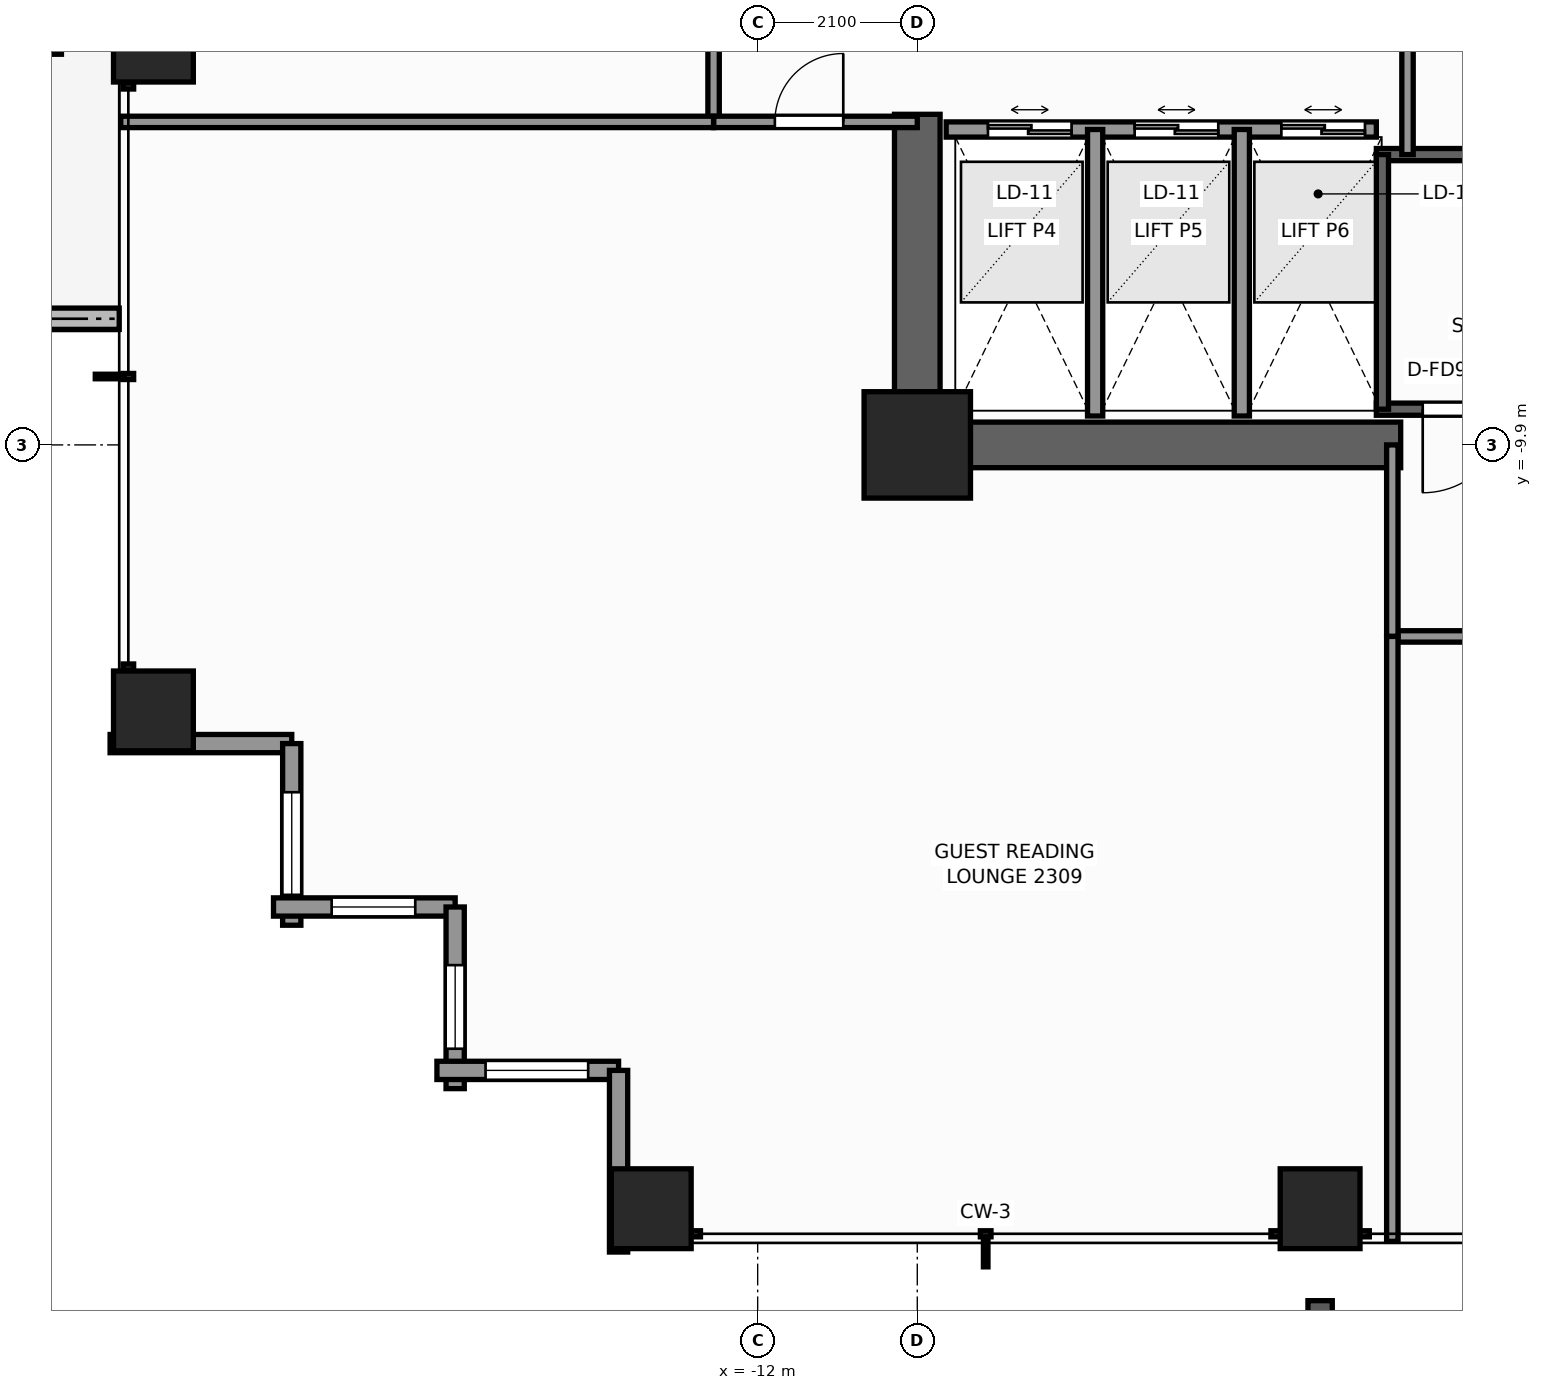
"""IFC4 building model, lengths in metres.
Left out: names, types, materials, properties, quantities, classifications, styles, units other than length and angle.
Written with IfcOpenShell. Run it as: python <this file> out.ifc"""

import sys

from ifc_helpers import new_model, si_unit, direction, frame, frame_2d, origin, origin_2d, place, context, subcontext, project, spatial, rectangle, extrude, element, fill, save


model = new_model("IFC4")
c1 = context("Model", 3, precision=1e-05, world=origin(), true_north=direction((0.0, 1.0)))
c2 = subcontext(c1, "Body", "Model", "MODEL_VIEW")
j1 = project(units=[si_unit("LENGTHUNIT", "METRE"), si_unit("PLANEANGLEUNIT", "RADIAN")], contexts=[c1])
p1 = place(None, origin())
s1 = spatial("IfcSite", under=j1, at=p1, CompositionType="ELEMENT")
p2 = place(p1, origin())
s2 = spatial("IfcBuilding", under=s1, at=p2, CompositionType="ELEMENT")
p3 = place(p2, frame((0.0, 0.0, 82.1)))
s3 = spatial("IfcBuildingStorey", under=s2, at=p3, CompositionType="ELEMENT", Elevation=82.1)
p4 = place(p3, frame((-3.54, -9.9, 0.0), z_axis=(0.0, 0.0, 1.0), x_axis=(-1.0, 0.0, 0.0)))
e1 = element("IfcWall", 1, at=p4, inside=s3, PredefinedType="SHEAR", context=c2, shape_type="SweptSolid", body=[
    extrude(rectangle(XDim=6.66, YDim=0.6, at=frame_2d((3.33, 0.0))), origin(), (0.0, 0.0, 1.0), 3.3),
])
p5 = place(p3, frame((-9.9, -9.6, 0.0), z_axis=(0.0, 0.0, 1.0), x_axis=(0.0, 1.0, 0.0)))
e2 = element("IfcWall", 2, at=p5, inside=s3, PredefinedType="SHEAR", context=c2, shape_type="SweptSolid", body=[
    extrude(rectangle(XDim=4.05, YDim=0.6, at=frame_2d((2.025, 0.0))), origin(), (0.0, 0.0, 1.0), 3.3),
])
p6 = place(p3, frame((-9.9, -9.9, 0.0), z_axis=(0.0, 0.0, 1.0), x_axis=(1.0, 0.0, 0.0)))
e3 = element("IfcColumn", 3, at=p6, inside=s3, PredefinedType="COLUMN", context=c2, shape_type="SweptSolid", body=[
    extrude(rectangle(XDim=1.4, YDim=1.4, at=origin_2d()), origin(), (0.0, 0.0, 1.0), 3.3),
])
for number, where, z_axis, x_axis in (
    (4, (-13.4, -19.95, 0.0), (0.0, 0.0, 1.0), (1.0, 0.0, 0.0)),
    (5, (-4.6, -19.95, 0.0), (0.0, 0.0, 1.0), (1.0, 0.0, 0.0)),
    (6, (-19.95, -13.4, 0.0), (0.0, 0.0, 1.0), (1.0, 0.0, 0.0)),
    (7, (-19.95, -4.6, 0.0), (0.0, 0.0, 1.0), (1.0, 0.0, 0.0)),
):
    element("IfcColumn", number, at=place(p3, frame(where, z_axis=z_axis, x_axis=x_axis)), inside=s3, PredefinedType="COLUMN", context=c2, shape_type="SweptSolid", body=[
        extrude(rectangle(XDim=1.05, YDim=1.05, at=origin_2d()), origin(), (0.0, 0.0, 1.0), 3.3),
    ])
p7 = place(p3, frame((-23.82, -8.24, -0.04), z_axis=(0.0, 0.0, 1.0), x_axis=(1.0, 0.0, 0.0)))
e8 = element("IfcWall", 8, at=p7, inside=s3, PredefinedType="PARAPET", context=c2, shape_type="SweptSolid", body=[
    extrude(rectangle(XDim=3.42, YDim=0.28, at=frame_2d((1.71, 0.0))), origin(), (0.0, 0.0, 1.0), 0.42),
])
p8 = place(p3, frame((-18.13, -13.83, 0.0), z_axis=(0.0, 0.0, 1.0), x_axis=(-1.0, 0.0, 0.0)))
e9 = element("IfcWall", 9, at=p8, inside=s3, PredefinedType="STANDARD", context=c2, shape_type="SweptSolid", body=[
    extrude(rectangle(XDim=2.39, YDim=0.24, at=frame_2d((1.195, 0.0))), origin(), (0.0, 0.0, 1.0), 2.459),
])
p9 = place(p3, frame((-18.13, -16.22, 0.0), z_axis=(0.0, 0.0, 1.0), x_axis=(0.0, 1.0, 0.0)))
e10 = element("IfcWall", 10, at=p9, inside=s3, PredefinedType="STANDARD", context=c2, shape_type="SweptSolid", body=[
    extrude(rectangle(XDim=2.39, YDim=0.24, at=frame_2d((1.195, 0.0))), origin(), (0.0, 0.0, 1.0), 2.459),
])
p10 = place(p9, frame((0.4, 0.0, 0.65)))
e11 = element("IfcOpeningElement", 11, at=p10, cuts=e10, PredefinedType="OPENING", context=c2, shape_type="SweptSolid", body=[
    extrude(rectangle(XDim=1.35, YDim=1.55, at=frame_2d((0.675, 0.775))), frame((0.0, 0.13, 0.0), z_axis=(0.0, -1.0, 0.0), x_axis=(1.0, 0.0, 0.0)), (0.0, 0.0, 1.0), 0.26),
])
p11 = place(p3, frame((-15.98, -15.98, 0.0), z_axis=(0.0, 0.0, 1.0), x_axis=(-1.0, 0.0, 0.0)))
e12 = element("IfcWall", 12, at=p11, inside=s3, PredefinedType="STANDARD", context=c2, shape_type="SweptSolid", body=[
    extrude(rectangle(XDim=2.39, YDim=0.24, at=frame_2d((1.195, 0.0))), origin(), (0.0, 0.0, 1.0), 2.459),
])
p12 = place(p11, frame((0.525, 0.0, 0.65)))
e13 = element("IfcOpeningElement", 13, at=p12, cuts=e12, PredefinedType="OPENING", context=c2, shape_type="SweptSolid", body=[
    extrude(rectangle(XDim=1.1, YDim=1.45, at=frame_2d((0.55, 0.725))), frame((0.0, 0.13, 0.0), z_axis=(0.0, -1.0, 0.0), x_axis=(1.0, 0.0, 0.0)), (0.0, 0.0, 1.0), 0.26),
])
p13 = place(p3, frame((-15.98, -18.37, 0.0), z_axis=(0.0, 0.0, 1.0), x_axis=(0.0, 1.0, 0.0)))
e14 = element("IfcWall", 14, at=p13, inside=s3, PredefinedType="STANDARD", context=c2, shape_type="SweptSolid", body=[
    extrude(rectangle(XDim=2.39, YDim=0.24, at=frame_2d((1.195, 0.0))), origin(), (0.0, 0.0, 1.0), 2.459),
])
p14 = place(p13, frame((0.525, 0.0, 0.65)))
e15 = element("IfcOpeningElement", 15, at=p14, cuts=e14, PredefinedType="OPENING", context=c2, shape_type="SweptSolid", body=[
    extrude(rectangle(XDim=1.1, YDim=1.45, at=frame_2d((0.55, 0.725))), frame((0.0, 0.13, 0.0), z_axis=(0.0, -1.0, 0.0), x_axis=(1.0, 0.0, 0.0)), (0.0, 0.0, 1.0), 0.26),
])
p15 = place(p3, frame((-13.83, -18.13, 0.0), z_axis=(0.0, 0.0, 1.0), x_axis=(-1.0, 0.0, 0.0)))
e16 = element("IfcWall", 16, at=p15, inside=s3, PredefinedType="STANDARD", context=c2, shape_type="SweptSolid", body=[
    extrude(rectangle(XDim=2.39, YDim=0.24, at=frame_2d((1.195, 0.0))), origin(), (0.0, 0.0, 1.0), 2.459),
])
p16 = place(p15, frame((0.4, 0.0, 0.65)))
e17 = element("IfcOpeningElement", 17, at=p16, cuts=e16, PredefinedType="OPENING", context=c2, shape_type="SweptSolid", body=[
    extrude(rectangle(XDim=1.35, YDim=1.55, at=frame_2d((0.675, 0.775))), frame((0.0, 0.13, 0.0), z_axis=(0.0, -1.0, 0.0), x_axis=(1.0, 0.0, 0.0)), (0.0, 0.0, 1.0), 0.26),
])
p17 = place(p3, frame((-13.83, -20.52, 0.0), z_axis=(0.0, 0.0, 1.0), x_axis=(0.0, 1.0, 0.0)))
e18 = element("IfcWall", 18, at=p17, inside=s3, PredefinedType="STANDARD", context=c2, shape_type="SweptSolid", body=[
    extrude(rectangle(XDim=2.39, YDim=0.24, at=frame_2d((1.195, 0.0))), origin(), (0.0, 0.0, 1.0), 2.459),
])
p18 = place(p3, frame((3.86, -9.43, 0.0), z_axis=(0.0, 0.0, 1.0), x_axis=(-1.0, 0.0, 0.0)))
e19 = element("IfcWall", 19, at=p18, inside=s3, PredefinedType="SHEAR", context=c2, shape_type="SweptSolid", body=[
    extrude(rectangle(XDim=7.72, YDim=0.16, at=frame_2d((3.86, 0.0))), origin(), (0.0, 0.0, 1.0), 3.3),
])
p19 = place(p18, frame((6.01, 0.0, 0.0)))
e20 = element("IfcOpeningElement", 20, at=p19, cuts=e19, PredefinedType="OPENING", context=c2, shape_type="SweptSolid", body=[
    extrude(rectangle(XDim=1.1, YDim=2.2, at=frame_2d((0.55, 1.1))), frame((0.0, 0.09, 0.0), z_axis=(0.0, -1.0, 0.0), x_axis=(1.0, 0.0, 0.0)), (0.0, 0.0, 1.0), 0.18),
])
p20 = place(p3, frame((-3.86, -6.08, 0.0), z_axis=(0.0, 0.0, 1.0), x_axis=(1.0, 0.0, 0.0)))
e21 = element("IfcWall", 21, at=p20, inside=s3, PredefinedType="SHEAR", context=c2, shape_type="SweptSolid", body=[
    extrude(rectangle(XDim=7.72, YDim=0.16, at=frame_2d((3.86, 0.0))), origin(), (0.0, 0.0, 1.0), 3.3),
])
p21 = place(p3, frame((-3.78, -9.43, 0.0), z_axis=(0.0, 0.0, 1.0), x_axis=(0.0, 1.0, 0.0)))
e22 = element("IfcWall", 22, at=p21, inside=s3, PredefinedType="SHEAR", context=c2, shape_type="SweptSolid", body=[
    extrude(rectangle(XDim=3.35, YDim=0.16, at=frame_2d((1.675, 0.0))), origin(), (0.0, 0.0, 1.0), 3.3),
])
p22 = place(p3, frame((-9.52, -5.75, 0.0), z_axis=(0.0, 0.0, 1.0), x_axis=(1.0, 0.0, 0.0)))
e23 = element("IfcWall", 23, at=p22, inside=s3, PredefinedType="SOLIDWALL", context=c2, shape_type="SweptSolid", body=[
    extrude(rectangle(XDim=5.66, YDim=0.2, at=frame_2d((2.83, 0.0))), origin(), (0.0, 0.0, 1.0), 3.08),
])
p23 = place(p22, frame((0.55, 0.0, 0.0)))
e24 = element("IfcOpeningElement", 24, at=p23, cuts=e23, PredefinedType="OPENING", context=c2, shape_type="SweptSolid", body=[
    extrude(rectangle(XDim=1.1, YDim=2.2, at=frame_2d((0.55, 1.1))), frame((0.0, 0.11, 0.0), z_axis=(0.0, -1.0, 0.0), x_axis=(1.0, 0.0, 0.0)), (0.0, 0.0, 1.0), 0.22),
])
p24 = place(p22, frame((2.48, 0.0, 0.0)))
e25 = element("IfcOpeningElement", 25, at=p24, cuts=e23, PredefinedType="OPENING", context=c2, shape_type="SweptSolid", body=[
    extrude(rectangle(XDim=1.1, YDim=2.2, at=frame_2d((0.55, 1.1))), frame((0.0, 0.11, 0.0), z_axis=(0.0, -1.0, 0.0), x_axis=(1.0, 0.0, 0.0)), (0.0, 0.0, 1.0), 0.22),
])
p25 = place(p22, frame((4.41, 0.0, 0.0)))
e26 = element("IfcOpeningElement", 26, at=p25, cuts=e23, PredefinedType="OPENING", context=c2, shape_type="SweptSolid", body=[
    extrude(rectangle(XDim=1.1, YDim=2.2, at=frame_2d((0.55, 1.1))), frame((0.0, 0.11, 0.0), z_axis=(0.0, -1.0, 0.0), x_axis=(1.0, 0.0, 0.0)), (0.0, 0.0, 1.0), 0.22),
])
for number, where, z_axis, x_axis in (
    (27, (-7.56, -9.52, 0.0), (0.0, 0.0, 1.0), (0.0, 1.0, 0.0)),
    (28, (-5.63, -9.52, 0.0), (0.0, 0.0, 1.0), (0.0, 1.0, 0.0)),
):
    element("IfcWall", number, at=place(p3, frame(where, z_axis=z_axis, x_axis=x_axis)), inside=s3, PredefinedType="SOLIDWALL", context=c2, shape_type="SweptSolid", body=[
        extrude(rectangle(XDim=3.77, YDim=0.2, at=frame_2d((1.885, 0.0))), origin(), (0.0, 0.0, 1.0), 3.08),
    ])
p26 = place(p3, frame((-3.45, -6.08, 0.0), z_axis=(0.0, 0.0, 1.0), x_axis=(0.0, 1.0, 0.0)))
e29 = element("IfcWall", 29, at=p26, inside=s3, PredefinedType="PARTITIONING", context=c2, shape_type="SweptSolid", body=[
    extrude(rectangle(XDim=2.36, YDim=0.15, at=frame_2d((1.18, 0.0))), origin(), (0.0, 0.0, 1.0), 3.08),
])
p27 = place(p3, frame((-3.65, -12.42, 0.0), z_axis=(0.0, 0.0, 1.0), x_axis=(1.0, 0.0, 0.0)))
e30 = element("IfcWall", 30, at=p27, inside=s3, PredefinedType="PARTITIONING", context=c2, shape_type="SweptSolid", body=[
    extrude(rectangle(XDim=16.23, YDim=0.15, at=frame_2d((8.115, 0.0))), origin(), (0.0, 0.0, 1.0), 2.292),
])
p28 = place(p27, frame((1.405, 0.0, 0.0)))
e31 = element("IfcOpeningElement", 31, at=p28, cuts=e30, PredefinedType="OPENING", context=c2, shape_type="SweptSolid", body=[
    extrude(rectangle(XDim=0.95, YDim=2.06, at=frame_2d((0.475, 1.03))), frame((0.0, 0.085, 0.0), z_axis=(0.0, -1.0, 0.0), x_axis=(1.0, 0.0, 0.0)), (0.0, 0.0, 1.0), 0.17),
])
p29 = place(p27, frame((10.735, 0.0, 0.0)))
e32 = element("IfcOpeningElement", 32, at=p29, cuts=e30, PredefinedType="OPENING", context=c2, shape_type="SweptSolid", body=[
    extrude(rectangle(XDim=0.9, YDim=2.06, at=frame_2d((0.45, 1.03))), frame((0.0, 0.085, 0.0), z_axis=(0.0, -1.0, 0.0), x_axis=(1.0, 0.0, 0.0)), (0.0, 0.0, 1.0), 0.17),
])
p30 = place(p3, frame((-3.65, -12.42, 0.0), z_axis=(0.0, 0.0, 1.0), x_axis=(0.0, 1.0, 0.0)))
e33 = element("IfcWall", 33, at=p30, inside=s3, PredefinedType="PARTITIONING", context=c2, shape_type="SweptSolid", body=[
    extrude(rectangle(XDim=2.52, YDim=0.15, at=frame_2d((1.26, 0.0))), origin(), (0.0, 0.0, 1.0), 3.08),
])
p31 = place(p3, frame((-12.58, -5.65, 0.0), z_axis=(0.0, 0.0, 1.0), x_axis=(0.0, 1.0, 0.0)))
e34 = element("IfcWall", 34, at=p31, inside=s3, PredefinedType="PARTITIONING", context=c2, shape_type="SweptSolid", body=[
    extrude(rectangle(XDim=3.6, YDim=0.15, at=frame_2d((1.8, 0.0))), origin(), (0.0, 0.0, 1.0), 2.292),
])
p32 = place(p31, frame((2.156, 0.0, 0.0)))
e35 = element("IfcOpeningElement", 35, at=p32, cuts=e34, PredefinedType="OPENING", context=c2, shape_type="SweptSolid", body=[
    extrude(rectangle(XDim=0.9, YDim=2.06, at=frame_2d((0.45, 1.03))), frame((0.0, 0.085, 0.0), z_axis=(0.0, -1.0, 0.0), x_axis=(1.0, 0.0, 0.0)), (0.0, 0.0, 1.0), 0.17),
])
p33 = place(p3, frame((-12.58, -5.65, 0.0), z_axis=(0.0, 0.0, 1.0), x_axis=(1.0, 0.0, 0.0)))
e36 = element("IfcWall", 36, at=p33, inside=s3, PredefinedType="PARTITIONING", context=c2, shape_type="SweptSolid", body=[
    extrude(rectangle(XDim=2.68, YDim=0.15, at=frame_2d((1.34, 0.0))), origin(), (0.0, 0.0, 1.0), 3.08),
])
p34 = place(p33, frame((0.806, 0.0, 0.0)))
e37 = element("IfcOpeningElement", 37, at=p34, cuts=e36, PredefinedType="OPENING", context=c2, shape_type="SweptSolid", body=[
    extrude(rectangle(XDim=0.9, YDim=2.06, at=frame_2d((0.45, 1.03))), frame((0.0, 0.085, 0.0), z_axis=(0.0, -1.0, 0.0), x_axis=(1.0, 0.0, 0.0)), (0.0, 0.0, 1.0), 0.17),
])
p35 = place(p3, frame((-20.38, -5.65, 0.0), z_axis=(0.0, 0.0, 1.0), x_axis=(1.0, 0.0, 0.0)))
e38 = element("IfcWall", 38, at=p35, inside=s3, PredefinedType="PARTITIONING", context=c2, shape_type="SweptSolid", body=[
    extrude(rectangle(XDim=7.8, YDim=0.15, at=frame_2d((3.9, 0.0))), origin(), (0.0, 0.0, 1.0), 2.449),
])
p36 = place(p3, frame((-3.65, -20.38, 0.0), z_axis=(0.0, 0.0, 1.0), x_axis=(0.0, 1.0, 0.0)))
e39 = element("IfcWall", 39, at=p36, inside=s3, PredefinedType="PARTITIONING", context=c2, shape_type="SweptSolid", body=[
    extrude(rectangle(XDim=7.96, YDim=0.15, at=frame_2d((3.98, 0.0))), origin(), (0.0, 0.0, 1.0), 2.449),
])
p37 = place(p10, origin())
e40 = element("IfcWindow", 40, at=p37, inside=s3, PartitioningType="SINGLE_PANEL", PredefinedType="WINDOW", context=c2, shape_type="SweptSolid", body=[
    extrude(rectangle(XDim=1.35, YDim=1.55, at=frame_2d((0.675, 0.775))), frame((0.0, 0.03, 0.0), z_axis=(0.0, -1.0, 0.0), x_axis=(1.0, 0.0, 0.0)), (0.0, 0.0, 1.0), 0.06),
])
fill(e11, e40)
p38 = place(p12, origin())
e41 = element("IfcWindow", 41, at=p38, inside=s3, PartitioningType="SINGLE_PANEL", PredefinedType="WINDOW", context=c2, shape_type="SweptSolid", body=[
    extrude(rectangle(XDim=1.1, YDim=1.45, at=frame_2d((0.55, 0.725))), frame((0.0, 0.03, 0.0), z_axis=(0.0, -1.0, 0.0), x_axis=(1.0, 0.0, 0.0)), (0.0, 0.0, 1.0), 0.06),
])
fill(e13, e41)
p39 = place(p14, origin())
e42 = element("IfcWindow", 42, at=p39, inside=s3, PartitioningType="SINGLE_PANEL", PredefinedType="WINDOW", context=c2, shape_type="SweptSolid", body=[
    extrude(rectangle(XDim=1.1, YDim=1.45, at=frame_2d((0.55, 0.725))), frame((0.0, 0.03, 0.0), z_axis=(0.0, -1.0, 0.0), x_axis=(1.0, 0.0, 0.0)), (0.0, 0.0, 1.0), 0.06),
])
fill(e15, e42)
p40 = place(p16, origin())
e43 = element("IfcWindow", 43, at=p40, inside=s3, PartitioningType="SINGLE_PANEL", PredefinedType="WINDOW", context=c2, shape_type="SweptSolid", body=[
    extrude(rectangle(XDim=1.35, YDim=1.55, at=frame_2d((0.675, 0.775))), frame((0.0, 0.03, 0.0), z_axis=(0.0, -1.0, 0.0), x_axis=(1.0, 0.0, 0.0)), (0.0, 0.0, 1.0), 0.06),
])
fill(e17, e43)
p41 = place(p19, origin())
e44 = element("IfcDoor", 44, at=p41, inside=s3, OperationType="SINGLE_SWING_RIGHT", PredefinedType="DOOR", context=c2, shape_type="SweptSolid", body=[
    extrude(rectangle(XDim=1.1, YDim=2.2, at=frame_2d((0.55, 1.1))), frame((0.0, 0.025, 0.0), z_axis=(0.0, -1.0, 0.0), x_axis=(1.0, 0.0, 0.0)), (0.0, 0.0, 1.0), 0.05),
])
fill(e20, e44)
p42 = place(p23, origin())
e45 = element("IfcDoor", 45, at=p42, inside=s3, OperationType="DOUBLE_DOOR_SLIDING", PredefinedType="DOOR", context=c2, shape_type="SweptSolid", body=[
    extrude(rectangle(XDim=1.1, YDim=2.2, at=frame_2d((0.55, 1.1))), frame((0.0, 0.025, 0.0), z_axis=(0.0, -1.0, 0.0), x_axis=(1.0, 0.0, 0.0)), (0.0, 0.0, 1.0), 0.05),
])
fill(e24, e45)
p43 = place(p24, origin())
e46 = element("IfcDoor", 46, at=p43, inside=s3, OperationType="DOUBLE_DOOR_SLIDING", PredefinedType="DOOR", context=c2, shape_type="SweptSolid", body=[
    extrude(rectangle(XDim=1.1, YDim=2.2, at=frame_2d((0.55, 1.1))), frame((0.0, 0.025, 0.0), z_axis=(0.0, -1.0, 0.0), x_axis=(1.0, 0.0, 0.0)), (0.0, 0.0, 1.0), 0.05),
])
fill(e25, e46)
p44 = place(p25, origin())
e47 = element("IfcDoor", 47, at=p44, inside=s3, OperationType="DOUBLE_DOOR_SLIDING", PredefinedType="DOOR", context=c2, shape_type="SweptSolid", body=[
    extrude(rectangle(XDim=1.1, YDim=2.2, at=frame_2d((0.55, 1.1))), frame((0.0, 0.025, 0.0), z_axis=(0.0, -1.0, 0.0), x_axis=(1.0, 0.0, 0.0)), (0.0, 0.0, 1.0), 0.05),
])
fill(e26, e47)
p45 = place(p34, origin())
e48 = element("IfcDoor", 48, at=p45, inside=s3, OperationType="SINGLE_SWING_RIGHT", PredefinedType="DOOR", context=c2, shape_type="SweptSolid", body=[
    extrude(rectangle(XDim=0.9, YDim=2.06, at=frame_2d((0.45, 1.03))), frame((0.0, 0.025, 0.0), z_axis=(0.0, -1.0, 0.0), x_axis=(1.0, 0.0, 0.0)), (0.0, 0.0, 1.0), 0.05),
])
fill(e37, e48)
save(model, sys.argv[1])
